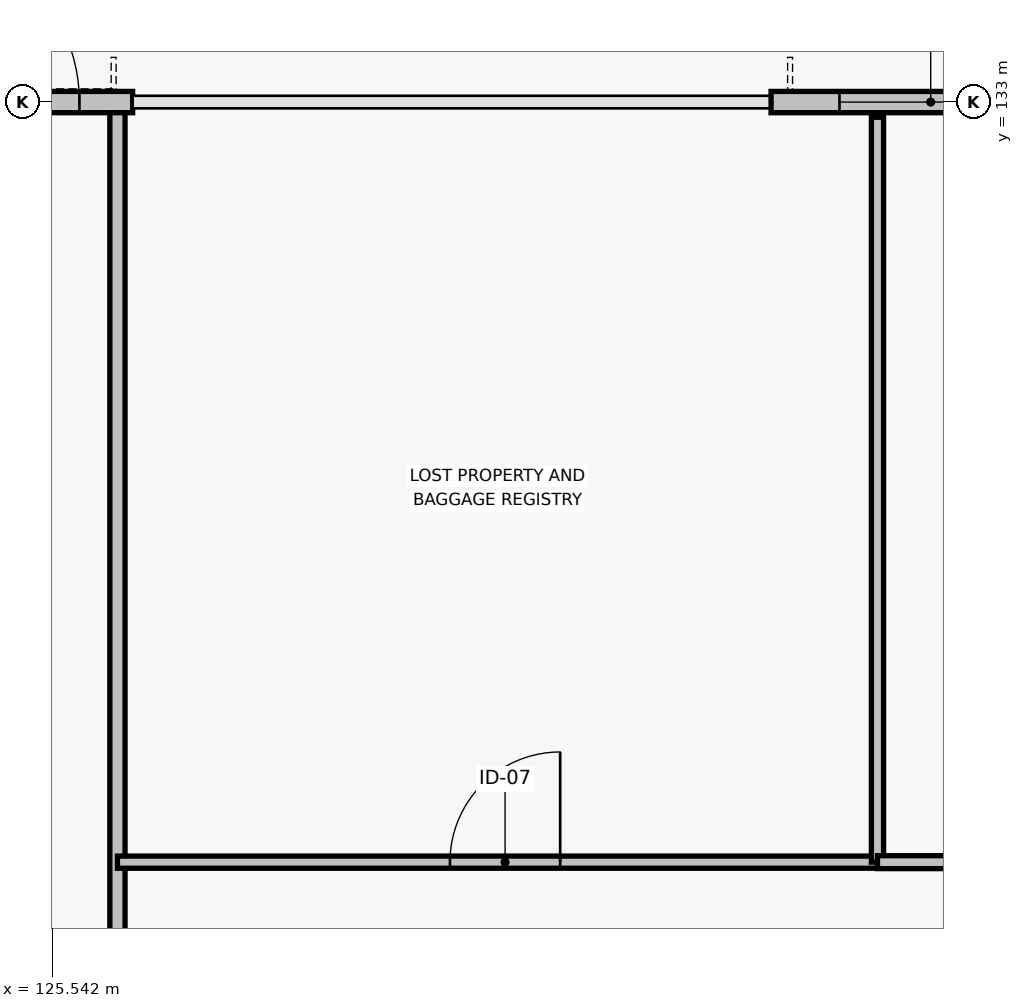
"""IFC4 building model, lengths in metres.
Left out: names, types, materials, properties, quantities, classifications, styles, units other than length and angle.
Written with IfcOpenShell. Run it as: python <this file> out.ifc"""

import sys

from ifc_helpers import new_model, si_unit, direction, frame, frame_2d, origin, place, context, subcontext, project, spatial, rectangle, extrude, element, fill, save


model = new_model("IFC4")
c1 = context("Model", 3, precision=1e-05, world=origin(), true_north=direction((0.0, 1.0)))
c2 = subcontext(c1, "Body", "Model", "MODEL_VIEW")
j1 = project(units=[si_unit("LENGTHUNIT", "METRE"), si_unit("PLANEANGLEUNIT", "RADIAN")], contexts=[c1])
p1 = place(None, origin())
s1 = spatial("IfcSite", under=j1, at=p1, CompositionType="ELEMENT")
p2 = place(p1, origin())
s2 = spatial("IfcBuilding", under=s1, at=p2, CompositionType="ELEMENT")
p3 = place(p2, origin())
s3 = spatial("IfcBuildingStorey", under=s2, at=p3, CompositionType="ELEMENT", Elevation=0.0)
p4 = place(p3, frame((122.4, 133.0, 0.0), z_axis=(0.0, 0.0, 1.0), x_axis=(1.0, 0.0, 0.0)))
e1 = element("IfcWall", 1, at=p4, inside=s3, PredefinedType="STANDARD", context=c2, shape_type="SweptSolid", body=[
    extrude(rectangle(XDim=4.2, YDim=0.28, at=frame_2d((2.1, 0.0))), origin(), (0.0, 0.0, 1.0), 4.765),
])
p5 = place(p4, frame((1.3, 0.0, 0.0)))
e2 = element("IfcOpeningElement", 2, at=p5, cuts=e1, PredefinedType="OPENING", context=c2, shape_type="SweptSolid", body=[
    extrude(rectangle(XDim=2.2, YDim=2.4, at=frame_2d((1.1, 1.2))), frame((0.0, 0.15, 0.0), z_axis=(0.0, -1.0, 0.0), x_axis=(1.0, 0.0, 0.0)), (0.0, 0.0, 1.0), 0.3),
])
p6 = place(p3, frame((135.0, 133.0, 0.0), z_axis=(0.0, 0.0, 1.0), x_axis=(1.0, 0.0, 0.0)))
e3 = element("IfcWall", 3, at=p6, inside=s3, PredefinedType="STANDARD", context=c2, shape_type="SweptSolid", body=[
    extrude(rectangle(XDim=4.2, YDim=0.28, at=frame_2d((2.1, 0.0))), origin(), (0.0, 0.0, 1.0), 4.765),
])
p7 = place(p6, frame((0.9, 0.0, 0.8)))
e4 = element("IfcOpeningElement", 4, at=p7, cuts=e3, PredefinedType="OPENING", context=c2, shape_type="SweptSolid", body=[
    extrude(rectangle(XDim=2.4, YDim=1.9, at=frame_2d((1.2, 0.95))), frame((0.0, 0.15, 0.0), z_axis=(0.0, -1.0, 0.0), x_axis=(1.0, 0.0, 0.0)), (0.0, 0.0, 1.0), 0.3),
])
p8 = place(p3, frame((126.4, 109.6, 0.0), z_axis=(0.0, 0.0, 1.0), x_axis=(0.0, 1.0, 0.0)))
e5 = element("IfcWall", 5, at=p8, inside=s3, PredefinedType="PARTITIONING", context=c2, shape_type="SweptSolid", body=[
    extrude(rectangle(XDim=23.26, YDim=0.2, at=frame_2d((11.63, 0.0))), origin(), (0.0, 0.0, 1.0), 5.16),
])
p9 = place(p8, frame((12.475, 0.0, 0.0), z_axis=(0.0, 0.0, 1.0), x_axis=(-1.0, 0.0, 0.0)))
e6 = element("IfcOpeningElement", 6, at=p9, cuts=e5, PredefinedType="OPENING", context=c2, shape_type="SweptSolid", body=[
    extrude(rectangle(XDim=1.15, YDim=2.2, at=frame_2d((0.575, 1.1))), frame((0.0, 0.11, 0.0), z_axis=(0.0, -1.0, 0.0), x_axis=(1.0, 0.0, 0.0)), (0.0, 0.0, 1.0), 0.22),
])
p10 = place(p3, frame((126.4, 123.0, 0.0), z_axis=(0.0, 0.0, 1.0), x_axis=(1.0, 0.0, 0.0)))
e7 = element("IfcWall", 7, at=p10, inside=s3, PredefinedType="PARTITIONING", context=c2, shape_type="SweptSolid", body=[
    extrude(rectangle(XDim=10.0, YDim=0.16, at=frame_2d((5.0, 0.0))), origin(), (0.0, 0.0, 1.0), 5.16),
])
p11 = place(p10, frame((5.825, 0.0, 0.0), z_axis=(0.0, 0.0, 1.0), x_axis=(-1.0, 0.0, 0.0)))
e8 = element("IfcOpeningElement", 8, at=p11, cuts=e7, PredefinedType="OPENING", context=c2, shape_type="SweptSolid", body=[
    extrude(rectangle(XDim=1.45, YDim=2.25, at=frame_2d((0.725, 1.125))), frame((0.0, 0.09, 0.0), z_axis=(0.0, -1.0, 0.0), x_axis=(1.0, 0.0, 0.0)), (0.0, 0.0, 1.0), 0.18),
])
p12 = place(p3, frame((136.4, 123.0, 0.0), z_axis=(0.0, 0.0, 1.0), x_axis=(0.0, 1.0, 0.0)))
e9 = element("IfcWall", 9, at=p12, inside=s3, PredefinedType="PARTITIONING", context=c2, shape_type="SweptSolid", body=[
    extrude(rectangle(XDim=9.8, YDim=0.16, at=frame_2d((4.9, 0.0))), origin(), (0.0, 0.0, 1.0), 5.16),
])
p13 = place(p3, frame((136.4, 123.0, 0.0), z_axis=(0.0, 0.0, 1.0), x_axis=(1.0, 0.0, 0.0)))
e10 = element("IfcWall", 10, at=p13, inside=s3, PredefinedType="PLUMBINGWALL", context=c2, shape_type="SweptSolid", body=[
    extrude(rectangle(XDim=9.8, YDim=0.17, at=frame_2d((4.9, 0.0))), origin(), (0.0, 0.0, 1.0), 5.16),
])
p14 = place(p13, frame((5.625, 0.0, 0.0)))
e11 = element("IfcOpeningElement", 11, at=p14, cuts=e10, PredefinedType="OPENING", context=c2, shape_type="SweptSolid", body=[
    extrude(rectangle(XDim=0.95, YDim=2.15, at=frame_2d((0.475, 1.075))), frame((0.0, 0.095, 0.0), z_axis=(0.0, -1.0, 0.0), x_axis=(1.0, 0.0, 0.0)), (0.0, 0.0, 1.0), 0.19),
])
p15 = place(p5, origin())
e12 = element("IfcDoor", 12, at=p15, inside=s3, OperationType="SINGLE_SWING_LEFT", PredefinedType="DOOR", context=c2, shape_type="SweptSolid", body=[
    extrude(rectangle(XDim=2.2, YDim=2.4, at=frame_2d((1.1, 1.2))), frame((0.0, 0.025, 0.0), z_axis=(0.0, -1.0, 0.0), x_axis=(1.0, 0.0, 0.0)), (0.0, 0.0, 1.0), 0.05),
])
fill(e2, e12)
p16 = place(p7, origin())
e13 = element("IfcWindow", 13, at=p16, inside=s3, PartitioningType="SINGLE_PANEL", PredefinedType="WINDOW", context=c2, shape_type="SweptSolid", body=[
    extrude(rectangle(XDim=2.4, YDim=1.9, at=frame_2d((1.2, 0.95))), frame((0.0, 0.03, 0.0), z_axis=(0.0, -1.0, 0.0), x_axis=(1.0, 0.0, 0.0)), (0.0, 0.0, 1.0), 0.06),
])
fill(e4, e13)
p17 = place(p11, origin())
e14 = element("IfcDoor", 14, at=p17, inside=s3, OperationType="SINGLE_SWING_RIGHT", PredefinedType="DOOR", context=c2, shape_type="SweptSolid", body=[
    extrude(rectangle(XDim=1.45, YDim=2.25, at=frame_2d((0.725, 1.125))), frame((0.0, 0.025, 0.0), z_axis=(0.0, -1.0, 0.0), x_axis=(1.0, 0.0, 0.0)), (0.0, 0.0, 1.0), 0.05),
])
fill(e8, e14)
save(model, sys.argv[1])
